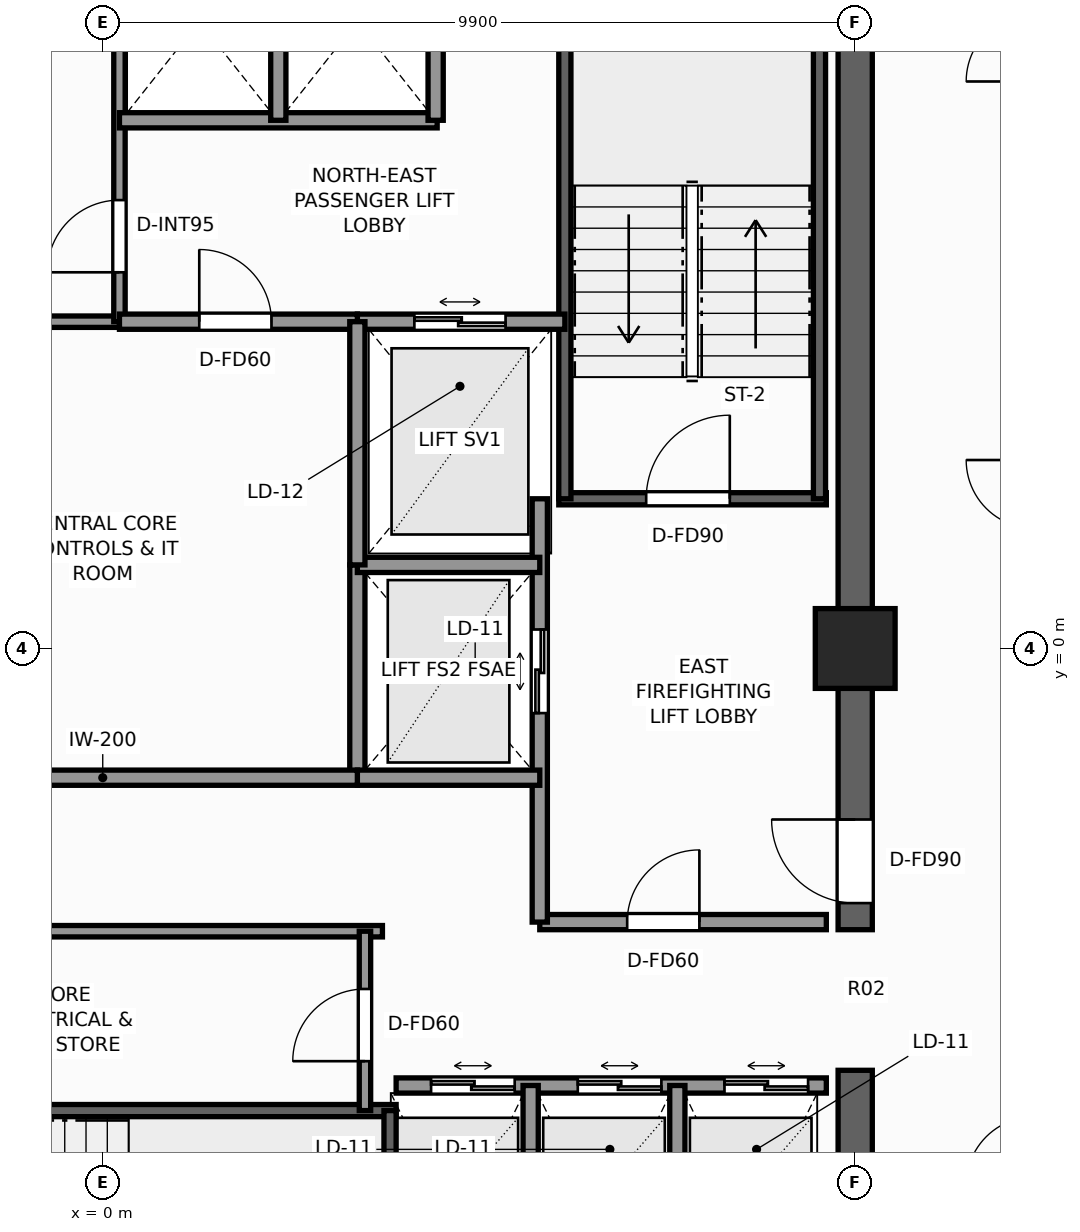
"""IFC4 building model, lengths in metres.
Left out: names, types, materials, properties, quantities, classifications, styles, units other than length and angle.
Written with IfcOpenShell. Run it as: python <this file> out.ifc"""

import sys

from ifc_helpers import new_model, si_unit, direction, frame, frame_2d, origin, origin_2d, place, context, subcontext, project, spatial, rectangle, extrude, element, fill, save


model = new_model("IFC4")
c1 = context("Model", 3, precision=1e-05, world=origin(), true_north=direction((0.0, 1.0)))
c2 = subcontext(c1, "Body", "Model", "MODEL_VIEW")
j1 = project(units=[si_unit("LENGTHUNIT", "METRE"), si_unit("PLANEANGLEUNIT", "RADIAN")], contexts=[c1])
p1 = place(None, origin())
s1 = spatial("IfcSite", under=j1, at=p1, CompositionType="ELEMENT")
p2 = place(p1, origin())
s2 = spatial("IfcBuilding", under=s1, at=p2, CompositionType="ELEMENT")
p3 = place(p2, frame((0.0, 0.0, 229.5)))
s3 = spatial("IfcBuildingStorey", under=s2, at=p3, CompositionType="ELEMENT", Elevation=229.5)
p4 = place(p3, frame((9.9, -9.675, 0.0), z_axis=(0.0, 0.0, 1.0), x_axis=(0.0, 1.0, 0.0)))
e1 = element("IfcWall", 1, at=p4, inside=s3, PredefinedType="SHEAR", context=c2, shape_type="SweptSolid", body=[
    extrude(rectangle(XDim=4.125, YDim=0.45, at=frame_2d((2.062, 0.0))), origin(), (0.0, 0.0, 1.0), 3.3),
])
p5 = place(p3, frame((9.9, -3.7, 0.0), z_axis=(0.0, 0.0, 1.0), x_axis=(0.0, 1.0, 0.0)))
e2 = element("IfcWall", 2, at=p5, inside=s3, PredefinedType="SHEAR", context=c2, shape_type="SweptSolid", body=[
    extrude(rectangle(XDim=13.375, YDim=0.45, at=frame_2d((6.688, 0.0))), origin(), (0.0, 0.0, 1.0), 3.3),
])
p6 = place(p5, frame((0.35, 0.0, 0.0)))
e3 = element("IfcOpeningElement", 3, at=p6, cuts=e2, PredefinedType="OPENING", context=c2, shape_type="SweptSolid", body=[
    extrude(rectangle(XDim=1.1, YDim=2.2, at=frame_2d((0.55, 1.1))), frame((0.0, 0.235, 0.0), z_axis=(0.0, -1.0, 0.0), x_axis=(1.0, 0.0, 0.0)), (0.0, 0.0, 1.0), 0.47),
])
p7 = place(p3, frame((9.9, 0.0, 0.0), z_axis=(0.0, 0.0, 1.0), x_axis=(1.0, 0.0, 0.0)))
e4 = element("IfcColumn", 4, at=p7, inside=s3, PredefinedType="COLUMN", context=c2, shape_type="SweptSolid", body=[
    extrude(rectangle(XDim=1.05, YDim=1.05, at=origin_2d()), origin(), (0.0, 0.0, 1.0), 3.3),
])
p8 = place(p3, frame((6.0, 1.97, 0.0), z_axis=(0.0, 0.0, 1.0), x_axis=(1.0, 0.0, 0.0)))
e5 = element("IfcWall", 5, at=p8, inside=s3, PredefinedType="SHEAR", context=c2, shape_type="SweptSolid", body=[
    extrude(rectangle(XDim=3.52, YDim=0.16, at=frame_2d((1.76, 0.0))), origin(), (0.0, 0.0, 1.0), 3.3),
])
p9 = place(p8, frame((1.15, 0.0, 0.0)))
e6 = element("IfcOpeningElement", 6, at=p9, cuts=e5, PredefinedType="OPENING", context=c2, shape_type="SweptSolid", body=[
    extrude(rectangle(XDim=1.1, YDim=2.2, at=frame_2d((0.55, 1.1))), frame((0.0, 0.09, 0.0), z_axis=(0.0, -1.0, 0.0), x_axis=(1.0, 0.0, 0.0)), (0.0, 0.0, 1.0), 0.18),
])
for number, where, z_axis, x_axis in (
    (7, (6.08, 1.97, 0.0), (0.0, 0.0, 1.0), (0.0, 1.0, 0.0)),
    (8, (9.43, 1.97, 0.0), (0.0, 0.0, 1.0), (0.0, 1.0, 0.0)),
):
    element("IfcWall", number, at=place(p3, frame(where, z_axis=z_axis, x_axis=x_axis)), inside=s3, PredefinedType="SHEAR", context=c2, shape_type="SweptSolid", body=[
        extrude(rectangle(XDim=7.56, YDim=0.16, at=frame_2d((3.78, 0.0))), origin(), (0.0, 0.0, 1.0), 3.3),
    ])
p10 = place(p3, frame((-3.86, -6.08, 0.0), z_axis=(0.0, 0.0, 1.0), x_axis=(1.0, 0.0, 0.0)))
e9 = element("IfcWall", 9, at=p10, inside=s3, PredefinedType="SHEAR", context=c2, shape_type="SweptSolid", body=[
    extrude(rectangle(XDim=7.72, YDim=0.16, at=frame_2d((3.86, 0.0))), origin(), (0.0, 0.0, 1.0), 3.3),
])
p11 = place(p3, frame((3.78, -9.43, 0.0), z_axis=(0.0, 0.0, 1.0), x_axis=(0.0, 1.0, 0.0)))
e10 = element("IfcWall", 10, at=p11, inside=s3, PredefinedType="SHEAR", context=c2, shape_type="SweptSolid", body=[
    extrude(rectangle(XDim=3.35, YDim=0.16, at=frame_2d((1.675, 0.0))), origin(), (0.0, 0.0, 1.0), 3.3),
])
p12 = place(p3, frame((5.75, -3.6, 0.0), z_axis=(0.0, 0.0, 1.0), x_axis=(1.0, 0.0, 0.0)))
e11 = element("IfcWall", 11, at=p12, inside=s3, PredefinedType="SOLIDWALL", context=c2, shape_type="SweptSolid", body=[
    extrude(rectangle(XDim=3.77, YDim=0.2, at=frame_2d((1.885, 0.0))), origin(), (0.0, 0.0, 1.0), 2.95),
])
p13 = place(p12, frame((1.15, 0.0, 0.0)))
e12 = element("IfcOpeningElement", 12, at=p13, cuts=e11, PredefinedType="OPENING", context=c2, shape_type="SweptSolid", body=[
    extrude(rectangle(XDim=0.95, YDim=2.06, at=frame_2d((0.475, 1.03))), frame((0.0, 0.11, 0.0), z_axis=(0.0, -1.0, 0.0), x_axis=(1.0, 0.0, 0.0)), (0.0, 0.0, 1.0), 0.22),
])
p14 = place(p3, frame((5.75, -3.6, 0.0), z_axis=(0.0, 0.0, 1.0), x_axis=(0.0, 1.0, 0.0)))
e13 = element("IfcWall", 13, at=p14, inside=s3, PredefinedType="SOLIDWALL", context=c2, shape_type="SweptSolid", body=[
    extrude(rectangle(XDim=5.57, YDim=0.2, at=frame_2d((2.785, 0.0))), origin(), (0.0, 0.0, 1.0), 2.95),
])
p15 = place(p14, frame((2.75, 0.0, 0.0)))
e14 = element("IfcOpeningElement", 14, at=p15, cuts=e13, PredefinedType="OPENING", context=c2, shape_type="SweptSolid", body=[
    extrude(rectangle(XDim=1.1, YDim=2.2, at=frame_2d((0.55, 1.1))), frame((0.0, 0.11, 0.0), z_axis=(0.0, -1.0, 0.0), x_axis=(1.0, 0.0, 0.0)), (0.0, 0.0, 1.0), 0.22),
])
p16 = place(p3, frame((3.35, -1.7, 0.0), z_axis=(0.0, 0.0, 1.0), x_axis=(0.0, 1.0, 0.0)))
e15 = element("IfcWall", 15, at=p16, inside=s3, PredefinedType="SOLIDWALL", context=c2, shape_type="SweptSolid", body=[
    extrude(rectangle(XDim=2.8, YDim=0.2, at=frame_2d((1.4, 0.0))), origin(), (0.0, 0.0, 1.0), 2.95),
])
for number, where, z_axis, x_axis in (
    (16, (3.35, -1.7, 0.0), (0.0, 0.0, 1.0), (1.0, 0.0, 0.0)),
    (17, (3.35, 1.1, 0.0), (0.0, 0.0, 1.0), (1.0, 0.0, 0.0)),
):
    element("IfcWall", number, at=place(p3, frame(where, z_axis=z_axis, x_axis=x_axis)), inside=s3, PredefinedType="SOLIDWALL", context=c2, shape_type="SweptSolid", body=[
        extrude(rectangle(XDim=2.4, YDim=0.2, at=frame_2d((1.2, 0.0))), origin(), (0.0, 0.0, 1.0), 2.95),
    ])
p17 = place(p3, frame((3.35, 4.3, 0.0), z_axis=(0.0, 0.0, 1.0), x_axis=(1.0, 0.0, 0.0)))
e18 = element("IfcWall", 18, at=p17, inside=s3, PredefinedType="SOLIDWALL", context=c2, shape_type="SweptSolid", body=[
    extrude(rectangle(XDim=2.73, YDim=0.2, at=frame_2d((1.365, 0.0))), origin(), (0.0, 0.0, 1.0), 2.95),
])
p18 = place(p17, frame((0.75, 0.0, 0.0)))
e19 = element("IfcOpeningElement", 19, at=p18, cuts=e18, PredefinedType="OPENING", context=c2, shape_type="SweptSolid", body=[
    extrude(rectangle(XDim=1.2, YDim=2.25, at=frame_2d((0.6, 1.125))), frame((0.0, 0.11, 0.0), z_axis=(0.0, -1.0, 0.0), x_axis=(1.0, 0.0, 0.0)), (0.0, 0.0, 1.0), 0.22),
])
p19 = place(p3, frame((-6.08, 4.3, 0.0), z_axis=(0.0, 0.0, 1.0), x_axis=(1.0, 0.0, 0.0)))
e20 = element("IfcWall", 20, at=p19, inside=s3, PredefinedType="PARTITIONING", context=c2, shape_type="SweptSolid", body=[
    extrude(rectangle(XDim=6.3, YDim=0.15, at=frame_2d((3.15, 0.0))), origin(), (0.0, 0.0, 1.0), 2.95),
])
p20 = place(p19, frame((1.05, 0.0, 0.0)))
e21 = element("IfcOpeningElement", 21, at=p20, cuts=e20, PredefinedType="OPENING", context=c2, shape_type="SweptSolid", body=[
    extrude(rectangle(XDim=0.85, YDim=2.03, at=frame_2d((0.425, 1.015))), frame((0.0, 0.085, 0.0), z_axis=(0.0, -1.0, 0.0), x_axis=(1.0, 0.0, 0.0)), (0.0, 0.0, 1.0), 0.17),
])
p21 = place(p3, frame((0.22, 4.3, 0.0), z_axis=(0.0, 0.0, 1.0), x_axis=(0.0, 1.0, 0.0)))
e22 = element("IfcWall", 22, at=p21, inside=s3, PredefinedType="PARTITIONING", context=c2, shape_type="SweptSolid", body=[
    extrude(rectangle(XDim=5.22, YDim=0.15, at=frame_2d((2.61, 0.0))), origin(), (0.0, 0.0, 1.0), 2.95),
])
p22 = place(p21, frame((0.65, 0.0, 0.0)))
e23 = element("IfcOpeningElement", 23, at=p22, cuts=e22, PredefinedType="OPENING", context=c2, shape_type="SweptSolid", body=[
    extrude(rectangle(XDim=0.95, YDim=2.06, at=frame_2d((0.475, 1.03))), frame((0.0, 0.085, 0.0), z_axis=(0.0, -1.0, 0.0), x_axis=(1.0, 0.0, 0.0)), (0.0, 0.0, 1.0), 0.17),
])
p23 = place(p3, frame((0.22, 6.95, 0.0), z_axis=(0.0, 0.0, 1.0), x_axis=(1.0, 0.0, 0.0)))
e24 = element("IfcWall", 24, at=p23, inside=s3, PredefinedType="SOLIDWALL", context=c2, shape_type="SweptSolid", body=[
    extrude(rectangle(XDim=4.18, YDim=0.2, at=frame_2d((2.09, 0.0))), origin(), (0.0, 0.0, 1.0), 2.95),
])
for number, where, z_axis, x_axis in (
    (25, (4.38, 6.95, 0.0), (0.0, 0.0, 1.0), (0.0, 1.0, 0.0)),
    (26, (2.31, 6.95, 0.0), (0.0, 0.0, 1.0), (0.0, 1.0, 0.0)),
):
    element("IfcWall", number, at=place(p3, frame(where, z_axis=z_axis, x_axis=x_axis)), inside=s3, PredefinedType="SOLIDWALL", context=c2, shape_type="SweptSolid", body=[
        extrude(rectangle(XDim=2.57, YDim=0.2, at=frame_2d((1.285, 0.0))), origin(), (0.0, 0.0, 1.0), 2.95),
    ])
p24 = place(p3, frame((3.86, -5.75, 0.0), z_axis=(0.0, 0.0, 1.0), x_axis=(1.0, 0.0, 0.0)))
e27 = element("IfcWall", 27, at=p24, inside=s3, PredefinedType="SOLIDWALL", context=c2, shape_type="SweptSolid", body=[
    extrude(rectangle(XDim=5.66, YDim=0.2, at=frame_2d((2.83, 0.0))), origin(), (0.0, 0.0, 1.0), 2.95),
])
p25 = place(p24, frame((0.46, 0.0, 0.0)))
e28 = element("IfcOpeningElement", 28, at=p25, cuts=e27, PredefinedType="OPENING", context=c2, shape_type="SweptSolid", body=[
    extrude(rectangle(XDim=1.1, YDim=2.2, at=frame_2d((0.55, 1.1))), frame((0.0, 0.11, 0.0), z_axis=(0.0, -1.0, 0.0), x_axis=(1.0, 0.0, 0.0)), (0.0, 0.0, 1.0), 0.22),
])
p26 = place(p24, frame((2.39, 0.0, 0.0)))
e29 = element("IfcOpeningElement", 29, at=p26, cuts=e27, PredefinedType="OPENING", context=c2, shape_type="SweptSolid", body=[
    extrude(rectangle(XDim=1.1, YDim=2.2, at=frame_2d((0.55, 1.1))), frame((0.0, 0.11, 0.0), z_axis=(0.0, -1.0, 0.0), x_axis=(1.0, 0.0, 0.0)), (0.0, 0.0, 1.0), 0.22),
])
p27 = place(p24, frame((4.32, 0.0, 0.0)))
e30 = element("IfcOpeningElement", 30, at=p27, cuts=e27, PredefinedType="OPENING", context=c2, shape_type="SweptSolid", body=[
    extrude(rectangle(XDim=1.1, YDim=2.2, at=frame_2d((0.55, 1.1))), frame((0.0, 0.11, 0.0), z_axis=(0.0, -1.0, 0.0), x_axis=(1.0, 0.0, 0.0)), (0.0, 0.0, 1.0), 0.22),
])
for number, where, z_axis, x_axis in (
    (31, (5.63, -9.52, 0.0), (0.0, 0.0, 1.0), (0.0, 1.0, 0.0)),
    (32, (7.56, -9.52, 0.0), (0.0, 0.0, 1.0), (0.0, 1.0, 0.0)),
):
    element("IfcWall", number, at=place(p3, frame(where, z_axis=z_axis, x_axis=x_axis)), inside=s3, PredefinedType="SOLIDWALL", context=c2, shape_type="SweptSolid", body=[
        extrude(rectangle(XDim=3.77, YDim=0.2, at=frame_2d((1.885, 0.0))), origin(), (0.0, 0.0, 1.0), 2.95),
    ])
p28 = place(p3, frame((0.22, 4.3, 0.0), z_axis=(0.0, 0.0, 1.0), x_axis=(1.0, 0.0, 0.0)))
e33 = element("IfcWall", 33, at=p28, inside=s3, PredefinedType="SOLIDWALL", context=c2, shape_type="SweptSolid", body=[
    extrude(rectangle(XDim=3.13, YDim=0.2, at=frame_2d((1.565, 0.0))), origin(), (0.0, 0.0, 1.0), 2.95),
])
p29 = place(p28, frame((1.05, 0.0, 0.0)))
e34 = element("IfcOpeningElement", 34, at=p29, cuts=e33, PredefinedType="OPENING", context=c2, shape_type="SweptSolid", body=[
    extrude(rectangle(XDim=0.95, YDim=2.06, at=frame_2d((0.475, 1.03))), frame((0.0, 0.11, 0.0), z_axis=(0.0, -1.0, 0.0), x_axis=(1.0, 0.0, 0.0)), (0.0, 0.0, 1.0), 0.22),
])
p30 = place(p3, frame((-3.35, -1.7, 0.0), z_axis=(0.0, 0.0, 1.0), x_axis=(1.0, 0.0, 0.0)))
e35 = element("IfcWall", 35, at=p30, inside=s3, PredefinedType="SOLIDWALL", context=c2, shape_type="SweptSolid", body=[
    extrude(rectangle(XDim=6.7, YDim=0.2, at=frame_2d((3.35, 0.0))), origin(), (0.0, 0.0, 1.0), 2.95),
])
p31 = place(p3, frame((3.35, 1.1, 0.0), z_axis=(0.0, 0.0, 1.0), x_axis=(0.0, 1.0, 0.0)))
e36 = element("IfcWall", 36, at=p31, inside=s3, PredefinedType="SOLIDWALL", context=c2, shape_type="SweptSolid", body=[
    extrude(rectangle(XDim=3.2, YDim=0.2, at=frame_2d((1.6, 0.0))), origin(), (0.0, 0.0, 1.0), 2.95),
])
p32 = place(p3, frame((-3.68, -3.72, 0.0), z_axis=(0.0, 0.0, 1.0), x_axis=(1.0, 0.0, 0.0)))
e37 = element("IfcWall", 37, at=p32, inside=s3, PredefinedType="PARTITIONING", context=c2, shape_type="SweptSolid", body=[
    extrude(rectangle(XDim=7.36, YDim=0.15, at=frame_2d((3.68, 0.0))), origin(), (0.0, 0.0, 1.0), 2.95),
])
p33 = place(p3, frame((3.45, -6.08, 0.0), z_axis=(0.0, 0.0, 1.0), x_axis=(0.0, 1.0, 0.0)))
e38 = element("IfcWall", 38, at=p33, inside=s3, PredefinedType="PARTITIONING", context=c2, shape_type="SweptSolid", body=[
    extrude(rectangle(XDim=2.36, YDim=0.15, at=frame_2d((1.18, 0.0))), origin(), (0.0, 0.0, 1.0), 2.95),
])
p34 = place(p33, frame((0.65, 0.0, 0.0)))
e39 = element("IfcOpeningElement", 39, at=p34, cuts=e38, PredefinedType="OPENING", context=c2, shape_type="SweptSolid", body=[
    extrude(rectangle(XDim=0.95, YDim=2.06, at=frame_2d((0.475, 1.03))), frame((0.0, 0.085, 0.0), z_axis=(0.0, -1.0, 0.0), x_axis=(1.0, 0.0, 0.0)), (0.0, 0.0, 1.0), 0.17),
])
p35 = place(p9, origin())
e40 = element("IfcDoor", 40, at=p35, inside=s3, OperationType="SINGLE_SWING_RIGHT", PredefinedType="DOOR", context=c2, shape_type="SweptSolid", body=[
    extrude(rectangle(XDim=1.1, YDim=2.2, at=frame_2d((0.55, 1.1))), frame((0.0, 0.025, 0.0), z_axis=(0.0, -1.0, 0.0), x_axis=(1.0, 0.0, 0.0)), (0.0, 0.0, 1.0), 0.05),
])
fill(e6, e40)
p36 = place(p6, origin())
e41 = element("IfcDoor", 41, at=p36, inside=s3, OperationType="SINGLE_SWING_RIGHT", PredefinedType="DOOR", context=c2, shape_type="SweptSolid", body=[
    extrude(rectangle(XDim=1.1, YDim=2.2, at=frame_2d((0.55, 1.1))), frame((0.0, 0.025, 0.0), z_axis=(0.0, -1.0, 0.0), x_axis=(1.0, 0.0, 0.0)), (0.0, 0.0, 1.0), 0.05),
])
fill(e3, e41)
p37 = place(p15, origin())
e42 = element("IfcDoor", 42, at=p37, inside=s3, OperationType="DOUBLE_DOOR_SLIDING", PredefinedType="DOOR", context=c2, shape_type="SweptSolid", body=[
    extrude(rectangle(XDim=1.1, YDim=2.2, at=frame_2d((0.55, 1.1))), frame((0.0, 0.025, 0.0), z_axis=(0.0, -1.0, 0.0), x_axis=(1.0, 0.0, 0.0)), (0.0, 0.0, 1.0), 0.05),
])
fill(e14, e42)
p38 = place(p18, origin())
e43 = element("IfcDoor", 43, at=p38, inside=s3, OperationType="DOUBLE_DOOR_SLIDING", PredefinedType="DOOR", context=c2, shape_type="SweptSolid", body=[
    extrude(rectangle(XDim=1.2, YDim=2.25, at=frame_2d((0.6, 1.125))), frame((0.0, 0.025, 0.0), z_axis=(0.0, -1.0, 0.0), x_axis=(1.0, 0.0, 0.0)), (0.0, 0.0, 1.0), 0.05),
])
fill(e19, e43)
p39 = place(p22, origin())
e44 = element("IfcDoor", 44, at=p39, inside=s3, OperationType="SINGLE_SWING_LEFT", PredefinedType="DOOR", context=c2, shape_type="SweptSolid", body=[
    extrude(rectangle(XDim=0.95, YDim=2.06, at=frame_2d((0.475, 1.03))), frame((0.0, 0.025, 0.0), z_axis=(0.0, -1.0, 0.0), x_axis=(1.0, 0.0, 0.0)), (0.0, 0.0, 1.0), 0.05),
])
fill(e23, e44)
p40 = place(p25, origin())
e45 = element("IfcDoor", 45, at=p40, inside=s3, OperationType="DOUBLE_DOOR_SLIDING", PredefinedType="DOOR", context=c2, shape_type="SweptSolid", body=[
    extrude(rectangle(XDim=1.1, YDim=2.2, at=frame_2d((0.55, 1.1))), frame((0.0, 0.025, 0.0), z_axis=(0.0, -1.0, 0.0), x_axis=(1.0, 0.0, 0.0)), (0.0, 0.0, 1.0), 0.05),
])
fill(e28, e45)
p41 = place(p26, origin())
e46 = element("IfcDoor", 46, at=p41, inside=s3, OperationType="DOUBLE_DOOR_SLIDING", PredefinedType="DOOR", context=c2, shape_type="SweptSolid", body=[
    extrude(rectangle(XDim=1.1, YDim=2.2, at=frame_2d((0.55, 1.1))), frame((0.0, 0.025, 0.0), z_axis=(0.0, -1.0, 0.0), x_axis=(1.0, 0.0, 0.0)), (0.0, 0.0, 1.0), 0.05),
])
fill(e29, e46)
p42 = place(p27, origin())
e47 = element("IfcDoor", 47, at=p42, inside=s3, OperationType="DOUBLE_DOOR_SLIDING", PredefinedType="DOOR", context=c2, shape_type="SweptSolid", body=[
    extrude(rectangle(XDim=1.1, YDim=2.2, at=frame_2d((0.55, 1.1))), frame((0.0, 0.025, 0.0), z_axis=(0.0, -1.0, 0.0), x_axis=(1.0, 0.0, 0.0)), (0.0, 0.0, 1.0), 0.05),
])
fill(e30, e47)
p43 = place(p13, origin())
e48 = element("IfcDoor", 48, at=p43, inside=s3, OperationType="SINGLE_SWING_RIGHT", PredefinedType="DOOR", context=c2, shape_type="SweptSolid", body=[
    extrude(rectangle(XDim=0.95, YDim=2.06, at=frame_2d((0.475, 1.03))), frame((0.0, 0.025, 0.0), z_axis=(0.0, -1.0, 0.0), x_axis=(1.0, 0.0, 0.0)), (0.0, 0.0, 1.0), 0.05),
])
fill(e12, e48)
p44 = place(p29, origin())
e49 = element("IfcDoor", 49, at=p44, inside=s3, OperationType="SINGLE_SWING_LEFT", PredefinedType="DOOR", context=c2, shape_type="SweptSolid", body=[
    extrude(rectangle(XDim=0.95, YDim=2.06, at=frame_2d((0.475, 1.03))), frame((0.0, 0.025, 0.0), z_axis=(0.0, -1.0, 0.0), x_axis=(1.0, 0.0, 0.0)), (0.0, 0.0, 1.0), 0.05),
])
fill(e34, e49)
p45 = place(p34, origin())
e50 = element("IfcDoor", 50, at=p45, inside=s3, OperationType="SINGLE_SWING_LEFT", PredefinedType="DOOR", context=c2, shape_type="SweptSolid", body=[
    extrude(rectangle(XDim=0.95, YDim=2.06, at=frame_2d((0.475, 1.03))), frame((0.0, 0.025, 0.0), z_axis=(0.0, -1.0, 0.0), x_axis=(1.0, 0.0, 0.0)), (0.0, 0.0, 1.0), 0.05),
])
fill(e39, e50)
save(model, sys.argv[1])
